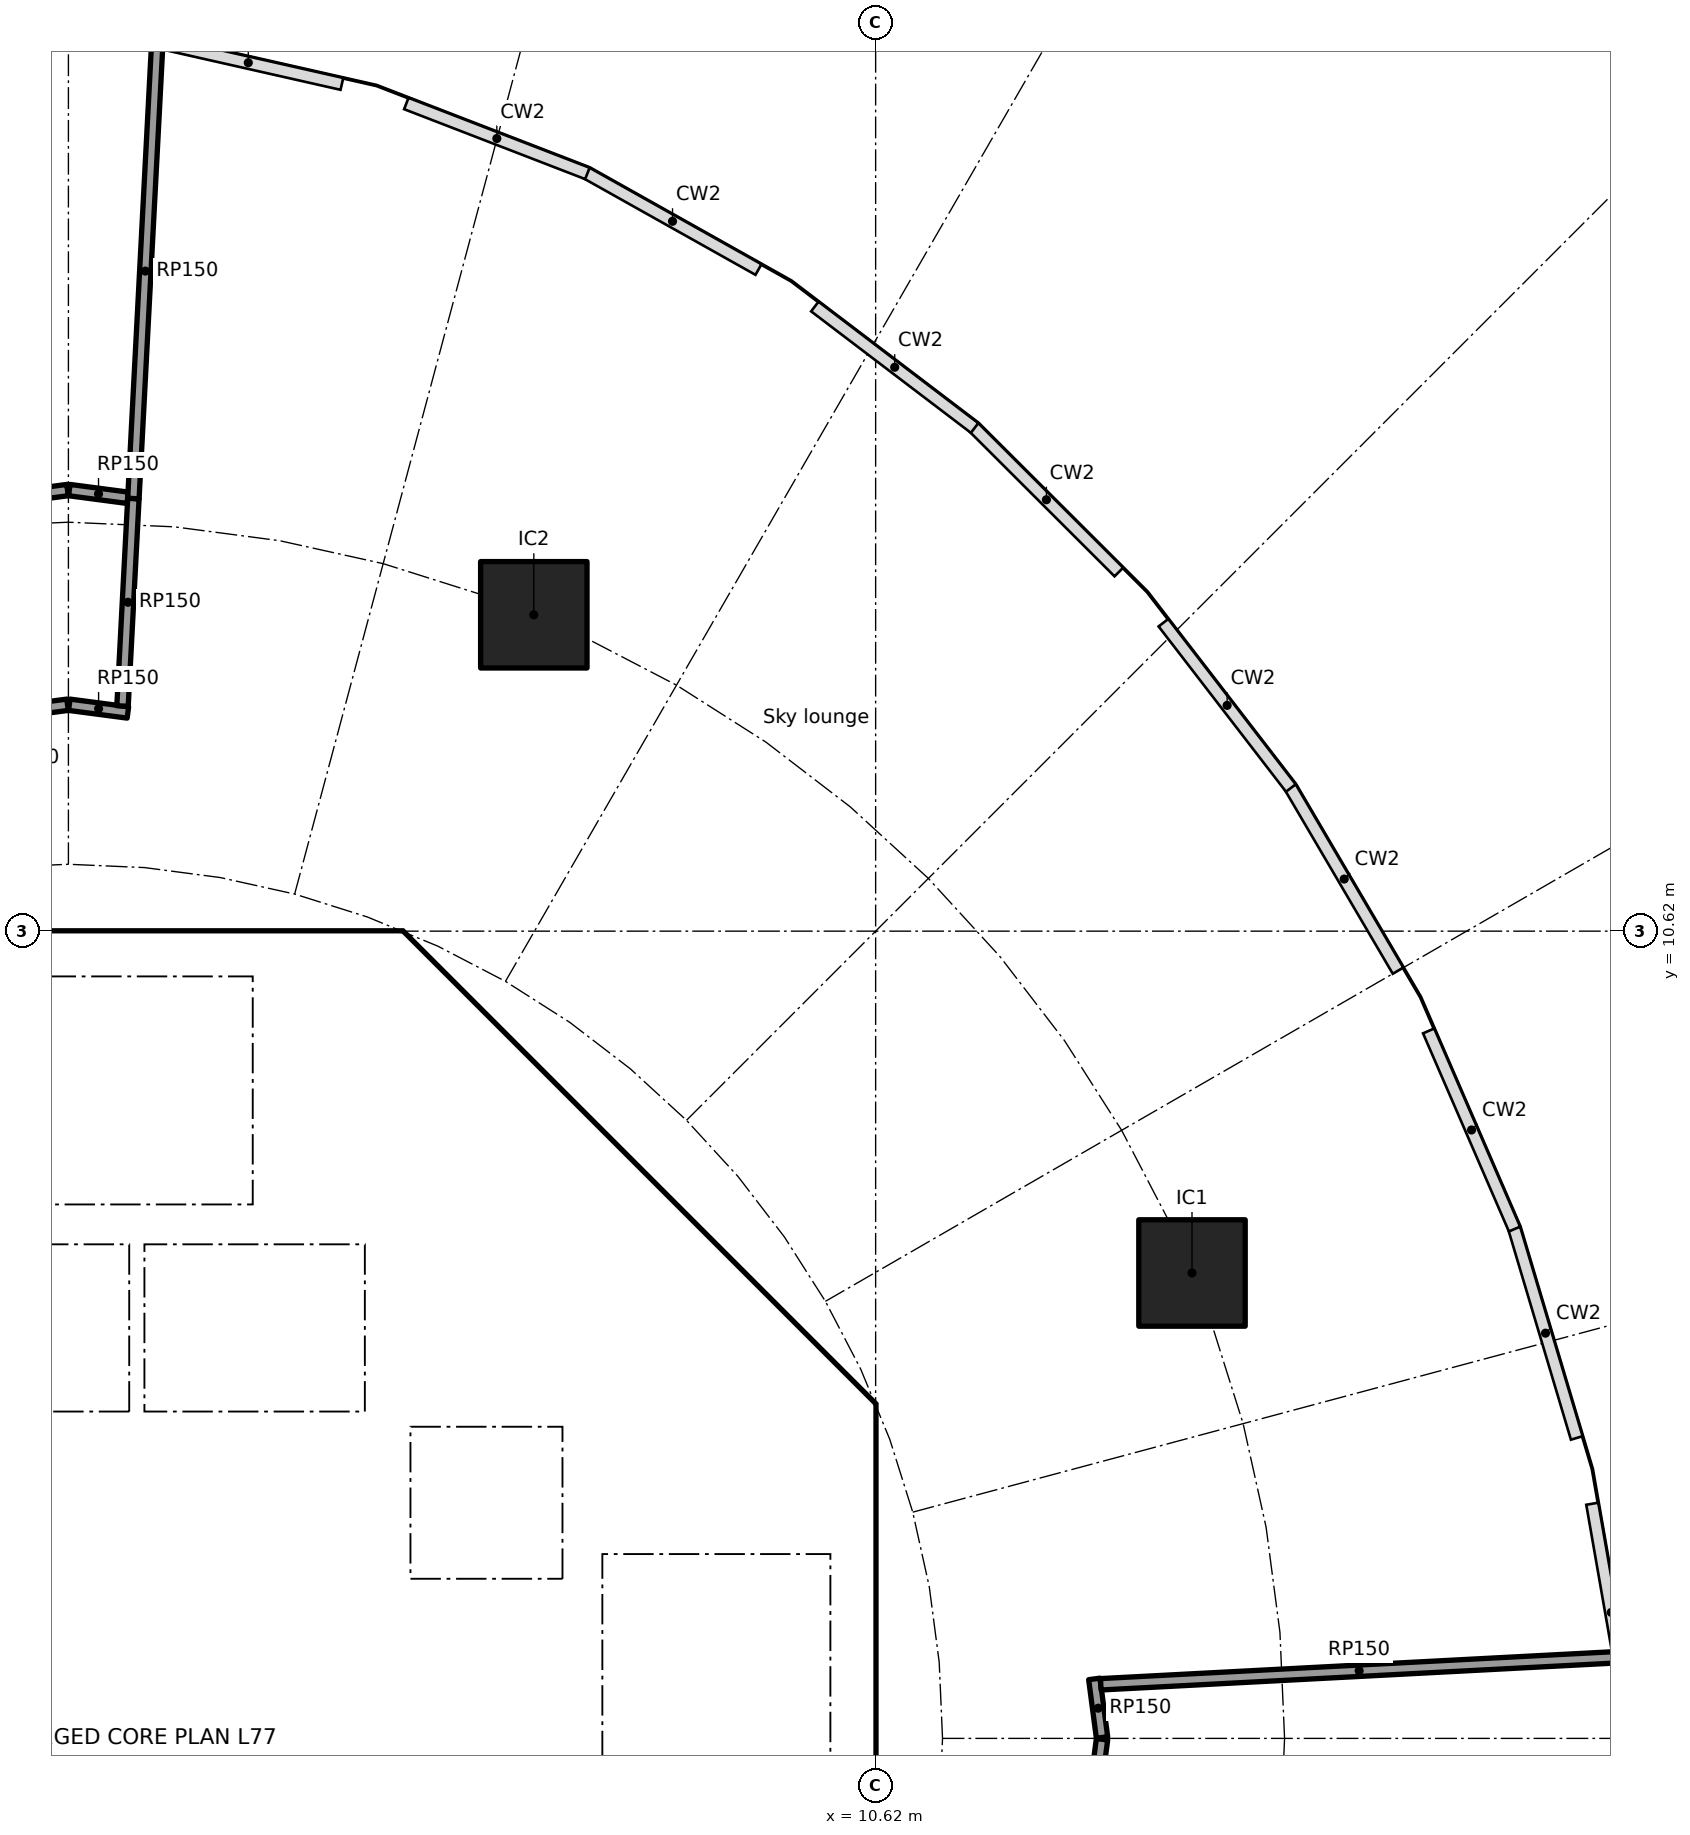
"""IFC4 building model, lengths in metres.
Left out: names, types, materials, properties, quantities, classifications, styles, units other than length and angle.
Written with IfcOpenShell. Run it as: python <this file> out.ifc"""

import sys

from ifc_helpers import new_model, si_unit, direction, frame, frame_2d, origin, origin_2d, place, context, subcontext, project, spatial, polyline, rectangle, outline, extrude, element, fill, save


model = new_model("IFC4")
c1 = context("Model", 3, precision=1e-05, world=origin(), true_north=direction((0.0, 1.0)))
c2 = subcontext(c1, "Body", "Model", "MODEL_VIEW")
j1 = project(units=[si_unit("LENGTHUNIT", "METRE"), si_unit("PLANEANGLEUNIT", "RADIAN")], contexts=[c1])
p1 = place(None, origin())
s1 = spatial("IfcSite", under=j1, at=p1, CompositionType="ELEMENT")
p2 = place(p1, origin())
s2 = spatial("IfcBuilding", under=s1, at=p2, CompositionType="ELEMENT")
p3 = place(p2, frame((0.0, 0.0, 310.3)))
s3 = spatial("IfcBuildingStorey", under=s2, at=p3, CompositionType="ELEMENT", Elevation=310.3)
for number, where, z_axis, x_axis in (
    (1, (14.782, 6.123, 0.0), (0.0, 0.0, 1.0), (1.0, 0.0, 0.0)),
    (2, (6.123, 14.782, 0.0), (0.0, 0.0, 1.0), (1.0, 0.0, 0.0)),
):
    element("IfcColumn", number, at=place(p3, frame(where, z_axis=z_axis, x_axis=x_axis)), inside=s3, PredefinedType="COLUMN", context=c2, shape_type="SweptSolid", body=[
        extrude(rectangle(XDim=1.4, YDim=1.4, at=origin_2d()), origin(), (0.0, 0.0, 1.0), 5.6),
    ])
p4 = place(p3, frame((9.988, 4.613, 0.0), z_axis=(0.0, 0.0, 1.0), x_axis=(-0.707106781187, 0.707106781187, 0.0)))
e3 = element("IfcWall", 3, at=p4, inside=s3, PredefinedType="SHEAR", context=c2, shape_type="SweptSolid", body=[
    extrude(rectangle(XDim=7.602, YDim=0.6, at=frame_2d((3.801, 0.0))), origin(), (0.0, 0.0, 1.0), 5.3),
])
p5 = place(p4, frame((3.201, 0.0, 0.0)))
e4 = element("IfcOpeningElement", 4, at=p5, cuts=e3, PredefinedType="OPENING", context=c2, shape_type="SweptSolid", body=[
    extrude(rectangle(XDim=1.2, YDim=2.1, at=frame_2d((0.6, 1.05))), frame((0.0, 0.31, 0.0), z_axis=(0.0, -1.0, 0.0), x_axis=(1.0, 0.0, 0.0)), (0.0, 0.0, 1.0), 0.62),
])
p6 = place(p3, frame((4.0, 4.3, 0.0), z_axis=(0.0, 0.0, 1.0), x_axis=(0.0, 1.0, 0.0)))
e5 = element("IfcWall", 5, at=p6, inside=s3, PredefinedType="SOLIDWALL", context=c2, shape_type="SweptSolid", body=[
    extrude(rectangle(XDim=2.2, YDim=0.2, at=frame_2d((1.1, 0.0))), origin(), (0.0, 0.0, 1.0), 5.3),
])
p7 = place(p6, frame((0.55, 0.0, 0.0)))
e6 = element("IfcOpeningElement", 6, at=p7, cuts=e5, PredefinedType="OPENING", context=c2, shape_type="SweptSolid", body=[
    extrude(rectangle(XDim=1.1, YDim=2.1, at=frame_2d((0.55, 1.05))), frame((0.0, 0.11, 0.0), z_axis=(0.0, -1.0, 0.0), x_axis=(1.0, 0.0, 0.0)), (0.0, 0.0, 1.0), 0.22),
])
p8 = place(p3, frame((-6.7, 2.0, 0.0), z_axis=(0.0, 0.0, 1.0), x_axis=(1.0, 0.0, 0.0)))
e7 = element("IfcWall", 7, at=p8, inside=s3, PredefinedType="SOLIDWALL", context=c2, shape_type="SweptSolid", body=[
    extrude(rectangle(XDim=13.4, YDim=0.2, at=frame_2d((6.7, 0.0))), origin(), (0.0, 0.0, 1.0), 5.3),
])
p9 = place(p8, frame((11.65, 0.0, 0.0)))
e8 = element("IfcOpeningElement", 8, at=p9, cuts=e7, PredefinedType="OPENING", context=c2, shape_type="SweptSolid", body=[
    extrude(rectangle(XDim=1.1, YDim=2.1, at=frame_2d((0.55, 1.05))), frame((0.0, 0.11, 0.0), z_axis=(0.0, -1.0, 0.0), x_axis=(1.0, 0.0, 0.0)), (0.0, 0.0, 1.0), 0.22),
])
p10 = place(p8, frame((0.75, 0.0, 0.0)))
e9 = element("IfcOpeningElement", 9, at=p10, cuts=e7, PredefinedType="OPENING", context=c2, shape_type="SweptSolid", body=[
    extrude(rectangle(XDim=0.9, YDim=2.1, at=frame_2d((0.45, 1.05))), frame((0.0, 0.11, 0.0), z_axis=(0.0, -1.0, 0.0), x_axis=(1.0, 0.0, 0.0)), (0.0, 0.0, 1.0), 0.22),
])
p11 = place(p8, frame((4.05, 0.0, 0.0)))
e10 = element("IfcOpeningElement", 10, at=p11, cuts=e7, PredefinedType="OPENING", context=c2, shape_type="SweptSolid", body=[
    extrude(rectangle(XDim=0.9, YDim=2.1, at=frame_2d((0.45, 1.05))), frame((0.0, 0.11, 0.0), z_axis=(0.0, -1.0, 0.0), x_axis=(1.0, 0.0, 0.0)), (0.0, 0.0, 1.0), 0.22),
])
p12 = place(p8, frame((7.35, 0.0, 0.0)))
e11 = element("IfcOpeningElement", 11, at=p12, cuts=e7, PredefinedType="OPENING", context=c2, shape_type="SweptSolid", body=[
    extrude(rectangle(XDim=0.9, YDim=2.1, at=frame_2d((0.45, 1.05))), frame((0.0, 0.11, 0.0), z_axis=(0.0, -1.0, 0.0), x_axis=(1.0, 0.0, 0.0)), (0.0, 0.0, 1.0), 0.22),
])
p13 = place(p8, frame((9.55, 0.0, 0.0)))
e12 = element("IfcOpeningElement", 12, at=p13, cuts=e7, PredefinedType="OPENING", context=c2, shape_type="SweptSolid", body=[
    extrude(rectangle(XDim=0.9, YDim=2.1, at=frame_2d((0.45, 1.05))), frame((0.0, 0.11, 0.0), z_axis=(0.0, -1.0, 0.0), x_axis=(1.0, 0.0, 0.0)), (0.0, 0.0, 1.0), 0.22),
])
p14 = place(p3, frame((6.7, 4.0, 0.0), z_axis=(0.0, 0.0, 1.0), x_axis=(1.0, 0.0, 0.0)))
e13 = element("IfcWall", 13, at=p14, inside=s3, PredefinedType="SOLIDWALL", context=c2, shape_type="SweptSolid", body=[
    extrude(rectangle(XDim=3.325, YDim=0.2, at=frame_2d((1.662, 0.0))), origin(), (0.0, 0.0, 1.0), 5.3),
])
p15 = place(p14, frame((1.25, 0.0, 0.0)))
e14 = element("IfcOpeningElement", 14, at=p15, cuts=e13, PredefinedType="OPENING", context=c2, shape_type="SweptSolid", body=[
    extrude(rectangle(XDim=1.1, YDim=2.1, at=frame_2d((0.55, 1.05))), frame((0.0, 0.11, 0.0), z_axis=(0.0, -1.0, 0.0), x_axis=(1.0, 0.0, 0.0)), (0.0, 0.0, 1.0), 0.22),
])
p16 = place(p3, frame((4.0, 7.025, 0.0), z_axis=(0.0, 0.0, 1.0), x_axis=(0.0, 1.0, 0.0)))
e15 = element("IfcWall", 15, at=p16, inside=s3, PredefinedType="SOLIDWALL", context=c2, shape_type="SweptSolid", body=[
    extrude(rectangle(XDim=3.0, YDim=0.2, at=frame_2d((1.5, 0.0))), origin(), (0.0, 0.0, 1.0), 5.3),
])
p17 = place(p16, frame((0.925, 0.0, 0.0)))
e16 = element("IfcOpeningElement", 16, at=p17, cuts=e15, PredefinedType="OPENING", context=c2, shape_type="SweptSolid", body=[
    extrude(rectangle(XDim=1.1, YDim=2.1, at=frame_2d((0.55, 1.05))), frame((0.0, 0.11, 0.0), z_axis=(0.0, -1.0, 0.0), x_axis=(1.0, 0.0, 0.0)), (0.0, 0.0, 1.0), 0.22),
])
p18 = place(p3, origin())
e17 = element("IfcWall", 17, at=p18, inside=s3, PredefinedType="SHEAR", context=c2, shape_type="SweptSolid", body=[
    extrude(outline(polyline([(-4.152, 10.025), (-4.401, 9.776), (-4.825, 10.2), (-4.401, 10.625), (4.401, 10.625), (4.825, 10.2), (4.401, 9.776), (4.152, 10.025), (-4.152, 10.025)])), origin(), (0.0, 0.0, 1.0), 5.3),
])
p19 = place(p3, origin())
e18 = element("IfcWall", 18, at=p19, inside=s3, PredefinedType="SHEAR", context=c2, shape_type="SweptSolid", body=[
    extrude(outline(polyline([(9.776, -4.401), (10.025, -4.152), (10.025, -3.801), (10.025, 4.152), (9.776, 4.401), (10.2, 4.825), (10.625, 4.401), (10.625, -4.401), (10.2, -4.825), (9.776, -4.401)])), origin(), (0.0, 0.0, 1.0), 5.3),
])
p20 = place(p3, frame((0.9, 4.3, 0.0), z_axis=(0.0, 0.0, 1.0), x_axis=(0.0, 1.0, 0.0)))
e19 = element("IfcWall", 19, at=p20, inside=s3, PredefinedType="SOLIDWALL", context=c2, shape_type="SweptSolid", body=[
    extrude(rectangle(XDim=2.2, YDim=0.2, at=frame_2d((1.1, 0.0))), origin(), (0.0, 0.0, 1.0), 5.3),
])
p21 = place(p3, origin())
e20 = element("IfcWall", 20, at=p21, inside=s3, PredefinedType="SOLIDWALL", context=c2, shape_type="SweptSolid", body=[
    extrude(outline(polyline([(-6.7, 4.3), (6.7, 4.3), (6.7, 2.1), (6.5, 2.1), (6.5, 4.1), (4.5, 4.1), (4.5, 2.1), (4.3, 2.1), (4.3, 4.1), (2.3, 4.1), (2.3, 2.1), (2.1, 2.1), (2.1, 4.1), (0.1, 4.1), (0.1, 2.1), (-0.1, 2.1), (-0.1, 4.1), (-4.3, 4.1), (-4.3, 2.1), (-4.5, 2.1), (-4.5, 4.1), (-6.5, 4.1), (-6.5, 2.1), (-6.7, 2.1), (-6.7, 4.3)])), origin(), (0.0, 0.0, 1.0), 5.3),
])
p22 = place(p3, origin())
e21 = element("IfcWall", 21, at=p22, inside=s3, PredefinedType="SOLIDWALL", context=c2, shape_type="SweptSolid", body=[
    extrude(outline(polyline([(4.1, 6.5), (-4.1, 6.5), (-4.1, 7.025), (4.1, 7.025), (4.1, 6.5)])), origin(), (0.0, 0.0, 1.0), 5.3),
])
p23 = place(p3, origin())
e22 = element("IfcWall", 22, at=p23, inside=s3, PredefinedType="SOLIDWALL", context=c2, shape_type="SweptSolid", body=[
    extrude(outline(polyline([(7.025, -3.9), (6.7, -3.9), (6.7, 3.9), (7.025, 3.9), (7.025, -3.9)])), origin(), (0.0, 0.0, 1.0), 5.3),
])
p24 = place(p3, frame((-3.471, 15.967, 0.0), z_axis=(0.0, 0.0, 1.0), x_axis=(0.991447148591, 0.130508817908, 0.0)))
e23 = element("IfcWall", 23, at=p24, inside=s3, PredefinedType="PARTITIONING", context=c2, shape_type="SweptSolid", body=[
    extrude(rectangle(XDim=3.489, YDim=0.15, at=frame_2d((1.744, 0.0))), origin(), (0.0, 0.0, 1.0), 5.3),
])
p25 = place(p3, frame((-2.812, 13.23, 0.0), z_axis=(0.0, 0.0, 1.0), x_axis=(0.991445467051, 0.130521591565, 0.0)))
e24 = element("IfcWall", 24, at=p25, inside=s3, PredefinedType="PARTITIONING", context=c2, shape_type="SweptSolid", body=[
    extrude(rectangle(XDim=2.824, YDim=0.15, at=frame_2d((1.412, 0.0))), origin(), (0.0, 0.0, 1.0), 5.3),
])
p26 = place(p25, frame((0.968, 0.0, 0.0)))
e25 = element("IfcOpeningElement", 25, at=p26, cuts=e24, PredefinedType="OPENING", context=c2, shape_type="SweptSolid", body=[
    extrude(rectangle(XDim=0.9, YDim=2.1, at=frame_2d((0.45, 1.05))), frame((0.0, 0.085, 0.0), z_axis=(0.0, -1.0, 0.0), x_axis=(1.0, 0.0, 0.0)), (0.0, 0.0, 1.0), 0.17),
])
p27 = place(p3, frame((0.012, 13.598, 0.0), z_axis=(0.0, 0.0, 1.0), x_axis=(0.991470322154, -0.130332652421, 0.0)))
e26 = element("IfcWall", 26, at=p27, inside=s3, PredefinedType="PARTITIONING", context=c2, shape_type="SweptSolid", body=[
    extrude(rectangle(XDim=0.777, YDim=0.15, at=frame_2d((0.389, 0.0))), origin(), (0.0, 0.0, 1.0), 5.3),
])
p28 = place(p3, frame((0.012, 16.423, 0.0), z_axis=(0.0, 0.0, 1.0), x_axis=(0.991462869305, -0.130389335417, 0.0)))
e27 = element("IfcWall", 27, at=p28, inside=s3, PredefinedType="PARTITIONING", context=c2, shape_type="SweptSolid", body=[
    extrude(rectangle(XDim=0.775, YDim=0.15, at=frame_2d((0.388, 0.0))), origin(), (0.0, 0.0, 1.0), 5.3),
])
p29 = place(p3, frame((0.712, 13.582, 0.0), z_axis=(0.0, 0.0, 1.0), x_axis=(0.052343174033, 0.99862915646, 0.0)))
e28 = element("IfcWall", 28, at=p29, inside=s3, PredefinedType="PARTITIONING", context=c2, shape_type="SweptSolid", body=[
    extrude(rectangle(XDim=2.733, YDim=0.15, at=frame_2d((1.367, 0.0))), origin(), (0.0, 0.0, 1.0), 5.3),
])
p30 = place(p3, frame((0.855, 16.312, 0.0), z_axis=(0.0, 0.0, 1.0), x_axis=(0.052310787201, 0.99863085349, 0.0)))
e29 = element("IfcWall", 29, at=p30, inside=s3, PredefinedType="PARTITIONING", context=c2, shape_type="SweptSolid", body=[
    extrude(rectangle(XDim=5.993, YDim=0.15, at=frame_2d((2.996, 0.0))), origin(), (0.0, 0.0, 1.0), 5.3),
])
p31 = place(p3, frame((13.497, 0.782, 0.0), z_axis=(0.0, 0.0, 1.0), x_axis=(0.130332652421, -0.991470322154, 0.0)))
e30 = element("IfcWall", 30, at=p31, inside=s3, PredefinedType="PARTITIONING", context=c2, shape_type="SweptSolid", body=[
    extrude(rectangle(XDim=0.777, YDim=0.15, at=frame_2d((0.389, 0.0))), origin(), (0.0, 0.0, 1.0), 5.3),
])
p32 = place(p3, frame((13.598, -0.012, 0.0), z_axis=(0.0, 0.0, 1.0), x_axis=(-0.130499283623, -0.991448403586, 0.0)))
e31 = element("IfcWall", 31, at=p32, inside=s3, PredefinedType="PARTITIONING", context=c2, shape_type="SweptSolid", body=[
    extrude(rectangle(XDim=3.527, YDim=0.15, at=frame_2d((1.763, 0.0))), origin(), (0.0, 0.0, 1.0), 5.3),
])
p33 = place(p3, frame((20.381, 1.068, 0.0), z_axis=(0.0, 0.0, 1.0), x_axis=(-0.998630283289, -0.052321671394, 0.0)))
e32 = element("IfcWall", 32, at=p33, inside=s3, PredefinedType="PARTITIONING", context=c2, shape_type="SweptSolid", body=[
    extrude(rectangle(XDim=6.808, YDim=0.15, at=frame_2d((3.404, 0.0))), origin(), (0.0, 0.0, 1.0), 5.3),
])
p34 = place(p9, origin())
e33 = element("IfcDoor", 33, at=p34, inside=s3, OperationType="DOUBLE_DOOR_SLIDING", PredefinedType="DOOR", context=c2, shape_type="SweptSolid", body=[
    extrude(rectangle(XDim=1.1, YDim=2.1, at=frame_2d((0.55, 1.05))), frame((0.0, 0.025, 0.0), z_axis=(0.0, -1.0, 0.0), x_axis=(1.0, 0.0, 0.0)), (0.0, 0.0, 1.0), 0.05),
])
fill(e8, e33)
p35 = place(p7, origin())
e34 = element("IfcDoor", 34, at=p35, inside=s3, OperationType="DOUBLE_DOOR_SLIDING", PredefinedType="DOOR", context=c2, shape_type="SweptSolid", body=[
    extrude(rectangle(XDim=1.1, YDim=2.1, at=frame_2d((0.55, 1.05))), frame((0.0, 0.025, 0.0), z_axis=(0.0, -1.0, 0.0), x_axis=(1.0, 0.0, 0.0)), (0.0, 0.0, 1.0), 0.05),
])
fill(e6, e34)
p36 = place(p15, frame((1.1, 0.0, 0.0), x_axis=(-1.0, 0.0, 0.0)))
e35 = element("IfcDoor", 35, at=p36, inside=s3, OperationType="SINGLE_SWING_RIGHT", PredefinedType="DOOR", context=c2, shape_type="SweptSolid", body=[
    extrude(rectangle(XDim=1.1, YDim=2.1, at=frame_2d((0.55, 1.05))), frame((0.0, 0.025, 0.0), z_axis=(0.0, -1.0, 0.0), x_axis=(1.0, 0.0, 0.0)), (0.0, 0.0, 1.0), 0.05),
])
fill(e14, e35)
p37 = place(p17, origin())
e36 = element("IfcDoor", 36, at=p37, inside=s3, OperationType="SINGLE_SWING_LEFT", PredefinedType="DOOR", context=c2, shape_type="SweptSolid", body=[
    extrude(rectangle(XDim=1.1, YDim=2.1, at=frame_2d((0.55, 1.05))), frame((0.0, 0.025, 0.0), z_axis=(0.0, -1.0, 0.0), x_axis=(1.0, 0.0, 0.0)), (0.0, 0.0, 1.0), 0.05),
])
fill(e16, e36)
p38 = place(p12, origin())
e37 = element("IfcDoor", 37, at=p38, inside=s3, OperationType="SINGLE_SWING_LEFT", PredefinedType="DOOR", context=c2, shape_type="SweptSolid", body=[
    extrude(rectangle(XDim=0.9, YDim=2.1, at=frame_2d((0.45, 1.05))), frame((0.0, 0.025, 0.0), z_axis=(0.0, -1.0, 0.0), x_axis=(1.0, 0.0, 0.0)), (0.0, 0.0, 1.0), 0.05),
])
fill(e11, e37)
p39 = place(p13, origin())
e38 = element("IfcDoor", 38, at=p39, inside=s3, OperationType="SINGLE_SWING_RIGHT", PredefinedType="DOOR", context=c2, shape_type="SweptSolid", body=[
    extrude(rectangle(XDim=0.9, YDim=2.1, at=frame_2d((0.45, 1.05))), frame((0.0, 0.025, 0.0), z_axis=(0.0, -1.0, 0.0), x_axis=(1.0, 0.0, 0.0)), (0.0, 0.0, 1.0), 0.05),
])
fill(e12, e38)
p40 = place(p5, origin())
e39 = element("IfcDoor", 39, at=p40, inside=s3, OperationType="SINGLE_SWING_LEFT", PredefinedType="DOOR", context=c2, shape_type="SweptSolid", body=[
    extrude(rectangle(XDim=1.2, YDim=2.1, at=frame_2d((0.6, 1.05))), frame((0.0, 0.025, 0.0), z_axis=(0.0, -1.0, 0.0), x_axis=(1.0, 0.0, 0.0)), (0.0, 0.0, 1.0), 0.05),
])
fill(e4, e39)
save(model, sys.argv[1])
